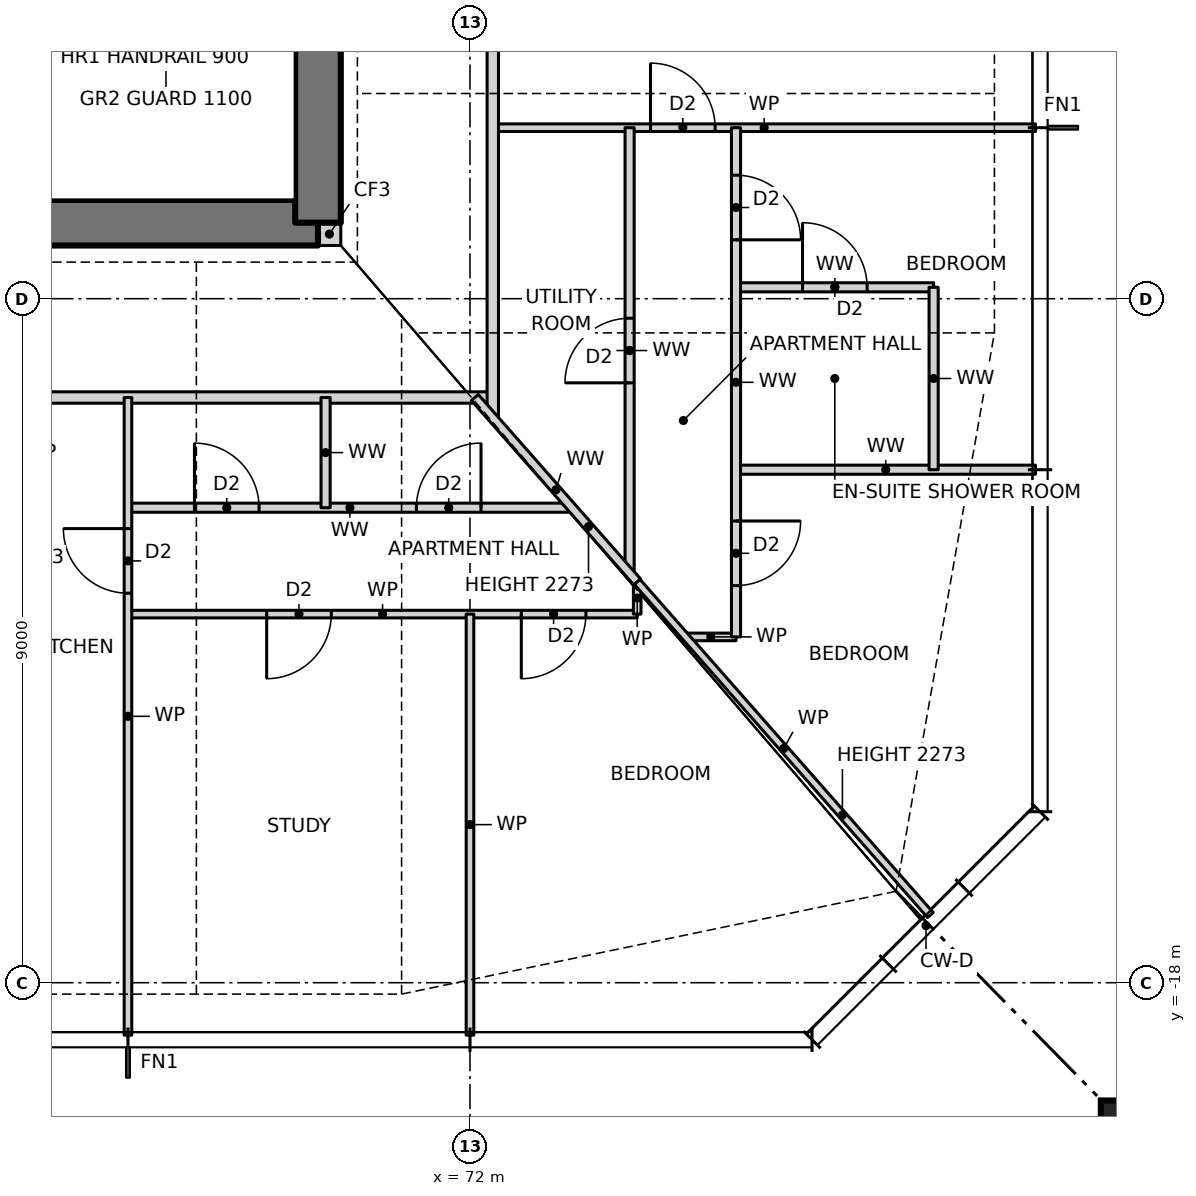
"""IFC4 building model, lengths in metres.
Left out: names, types, materials, properties, quantities, classifications, styles, units other than length and angle.
Written with IfcOpenShell. Run it as: python <this file> out.ifc"""

import sys

from ifc_helpers import new_model, si_unit, direction, frame, frame_2d, origin, origin_2d, place, context, subcontext, project, spatial, rectangle, hollow_rectangle, extrude, element, fill, save


model = new_model("IFC4")
c1 = context("Model", 3, precision=1e-05, world=origin(), true_north=direction((0.0, 1.0)))
c2 = subcontext(c1, "Body", "Model", "MODEL_VIEW")
j1 = project(units=[si_unit("LENGTHUNIT", "METRE"), si_unit("PLANEANGLEUNIT", "RADIAN")], contexts=[c1])
p1 = place(None, origin())
s1 = spatial("IfcSite", under=j1, at=p1, CompositionType="ELEMENT")
p2 = place(p1, origin())
s2 = spatial("IfcBuilding", under=s1, at=p2, CompositionType="ELEMENT")
p3 = place(p2, frame((0.0, 0.0, 71.0)))
s3 = spatial("IfcBuildingStorey", under=s2, at=p3, CompositionType="ELEMENT", Elevation=71.0)
p4 = place(p3, frame((80.9, -20.15, 0.0), z_axis=(0.0, 0.0, 1.0), x_axis=(1.0, 0.0, 0.0)))
e1 = element("IfcColumn", 1, at=p4, inside=s3, PredefinedType="COLUMN", context=c2, shape_type="SweptSolid", body=[
    extrude(hollow_rectangle(XDim=1.2, YDim=1.2, WallThickness=0.07, at=origin_2d()), origin(), (0.0, 0.0, 1.0), 3.5),
])
p5 = place(p3, frame((70.0, -8.15, 0.0), z_axis=(0.0, 0.0, 1.0), x_axis=(1.0, 0.0, 0.0)))
e2 = element("IfcWall", 2, at=p5, inside=s3, PredefinedType="SOLIDWALL", context=c2, shape_type="SweptSolid", body=[
    extrude(rectangle(XDim=0.3, YDim=0.3, at=frame_2d((0.15, 0.0))), origin(), (0.0, 0.0, 1.0), 3.5),
])
p6 = place(p3, frame((56.0, -8.0, 0.0), z_axis=(0.0, 0.0, 1.0), x_axis=(1.0, 0.0, 0.0)))
e3 = element("IfcWall", 3, at=p6, inside=s3, PredefinedType="SHEAR", context=c2, shape_type="SweptSolid", body=[
    extrude(rectangle(XDim=14.0, YDim=0.6, at=frame_2d((7.0, 0.0))), origin(), (0.0, 0.0, 1.0), 3.5),
])
p7 = place(p6, frame((2.7, 0.0, 0.0)))
e4 = element("IfcOpeningElement", 4, at=p7, cuts=e3, PredefinedType="OPENING", context=c2, shape_type="SweptSolid", body=[
    extrude(rectangle(XDim=0.9, YDim=2.1, at=frame_2d((0.45, 1.05))), frame((0.0, 0.31, 0.0), z_axis=(0.0, -1.0, 0.0), x_axis=(1.0, 0.0, 0.0)), (0.0, 0.0, 1.0), 0.62),
])
p8 = place(p6, frame((7.7, 0.0, 0.0)))
e5 = element("IfcOpeningElement", 5, at=p8, cuts=e3, PredefinedType="OPENING", context=c2, shape_type="SweptSolid", body=[
    extrude(rectangle(XDim=0.9, YDim=2.1, at=frame_2d((0.45, 1.05))), frame((0.0, 0.31, 0.0), z_axis=(0.0, -1.0, 0.0), x_axis=(1.0, 0.0, 0.0)), (0.0, 0.0, 1.0), 0.62),
])
p9 = place(p3, frame((70.0, -8.0, 0.0), z_axis=(0.0, 0.0, 1.0), x_axis=(0.0, 1.0, 0.0)))
e6 = element("IfcWall", 6, at=p9, inside=s3, PredefinedType="SHEAR", context=c2, shape_type="SweptSolid", body=[
    extrude(rectangle(XDim=16.0, YDim=0.6, at=frame_2d((8.0, 0.0))), origin(), (0.0, 0.0, 1.0), 3.5),
])
p10 = place(p9, frame((7.5, 0.0, 0.0)))
e7 = element("IfcOpeningElement", 7, at=p10, cuts=e6, PredefinedType="OPENING", context=c2, shape_type="SweptSolid", body=[
    extrude(rectangle(XDim=1.0, YDim=2.1, at=frame_2d((0.5, 1.05))), frame((0.0, 0.31, 0.0), z_axis=(0.0, -1.0, 0.0), x_axis=(1.0, 0.0, 0.0)), (0.0, 0.0, 1.0), 0.62),
])
p11 = place(p3, frame((74.836, -13.45, 0.0), z_axis=(0.0, 0.0, 1.0), x_axis=(1.0, 0.0, 0.0)))
e8 = element("IfcWall", 8, at=p11, inside=s3, PredefinedType="PARTITIONING", context=c2, shape_type="SweptSolid", body=[
    extrude(rectangle(XDim=0.664, YDim=0.1, at=frame_2d((0.332, 0.0))), origin(), (0.0, 0.0, 1.0), 3.2),
])
p12 = place(p3, frame((67.5, -13.15, 0.0), z_axis=(0.0, 0.0, 1.0), x_axis=(1.0, 0.0, 0.0)))
e9 = element("IfcWall", 9, at=p12, inside=s3, PredefinedType="PARTITIONING", context=c2, shape_type="SweptSolid", body=[
    extrude(rectangle(XDim=6.7, YDim=0.1, at=frame_2d((3.35, 0.0))), origin(), (0.0, 0.0, 1.0), 3.2),
])
p13 = place(p12, frame((1.825, 0.0, 0.0)))
e10 = element("IfcOpeningElement", 10, at=p13, cuts=e9, PredefinedType="OPENING", context=c2, shape_type="SweptSolid", body=[
    extrude(rectangle(XDim=0.85, YDim=2.1, at=frame_2d((0.425, 1.05))), frame((0.0, 0.06, 0.0), z_axis=(0.0, -1.0, 0.0), x_axis=(1.0, 0.0, 0.0)), (0.0, 0.0, 1.0), 0.12),
])
p14 = place(p12, frame((5.175, 0.0, 0.0)))
e11 = element("IfcOpeningElement", 11, at=p14, cuts=e9, PredefinedType="OPENING", context=c2, shape_type="SweptSolid", body=[
    extrude(rectangle(XDim=0.85, YDim=2.1, at=frame_2d((0.425, 1.05))), frame((0.0, 0.06, 0.0), z_axis=(0.0, -1.0, 0.0), x_axis=(1.0, 0.0, 0.0)), (0.0, 0.0, 1.0), 0.12),
])
p15 = place(p3, frame((67.5, -11.75, 0.0), z_axis=(0.0, 0.0, 1.0), x_axis=(1.0, 0.0, 0.0)))
e12 = element("IfcWall", 12, at=p15, inside=s3, PredefinedType="PARTITIONING", context=c2, shape_type="SweptSolid", body=[
    extrude(rectangle(XDim=5.84, YDim=0.12, at=frame_2d((2.92, 0.0))), origin(), (0.0, 0.0, 1.0), 3.2),
])
p16 = place(p15, frame((0.875, 0.0, 0.0)))
e13 = element("IfcOpeningElement", 13, at=p16, cuts=e12, PredefinedType="OPENING", context=c2, shape_type="SweptSolid", body=[
    extrude(rectangle(XDim=0.85, YDim=2.1, at=frame_2d((0.425, 1.05))), frame((0.0, 0.07, 0.0), z_axis=(0.0, -1.0, 0.0), x_axis=(1.0, 0.0, 0.0)), (0.0, 0.0, 1.0), 0.14),
])
p17 = place(p15, frame((3.795, 0.0, 0.0)))
e14 = element("IfcOpeningElement", 14, at=p17, cuts=e12, PredefinedType="OPENING", context=c2, shape_type="SweptSolid", body=[
    extrude(rectangle(XDim=0.85, YDim=2.1, at=frame_2d((0.425, 1.05))), frame((0.0, 0.07, 0.0), z_axis=(0.0, -1.0, 0.0), x_axis=(1.0, 0.0, 0.0)), (0.0, 0.0, 1.0), 0.14),
])
p18 = place(p3, frame((75.5, -11.25, 0.0), z_axis=(0.0, 0.0, 1.0), x_axis=(1.0, 0.0, 0.0)))
e15 = element("IfcWall", 15, at=p18, inside=s3, PredefinedType="PARTITIONING", context=c2, shape_type="SweptSolid", body=[
    extrude(rectangle(XDim=3.94, YDim=0.12, at=frame_2d((1.97, 0.0))), origin(), (0.0, 0.0, 1.0), 3.2),
])
p19 = place(p3, frame((53.7, -10.3, 0.0), z_axis=(0.0, 0.0, 1.0), x_axis=(1.0, 0.0, 0.0)))
e16 = element("IfcWall", 16, at=p19, inside=s3, PredefinedType="PARTITIONING", context=c2, shape_type="SweptSolid", body=[
    extrude(rectangle(XDim=18.6, YDim=0.15, at=frame_2d((9.3, 0.0))), origin(), (0.0, 0.0, 1.0), 3.2),
])
p20 = place(p19, frame((4.8, 0.0, 0.0)))
e17 = element("IfcOpeningElement", 17, at=p20, cuts=e16, PredefinedType="OPENING", context=c2, shape_type="SweptSolid", body=[
    extrude(rectangle(XDim=1.0, YDim=2.1, at=frame_2d((0.5, 1.05))), frame((0.0, 0.085, 0.0), z_axis=(0.0, -1.0, 0.0), x_axis=(1.0, 0.0, 0.0)), (0.0, 0.0, 1.0), 0.17),
])
p21 = place(p19, frame((10.2, 0.0, 0.0)))
e18 = element("IfcOpeningElement", 18, at=p21, cuts=e16, PredefinedType="OPENING", context=c2, shape_type="SweptSolid", body=[
    extrude(rectangle(XDim=1.0, YDim=2.1, at=frame_2d((0.5, 1.05))), frame((0.0, 0.085, 0.0), z_axis=(0.0, -1.0, 0.0), x_axis=(1.0, 0.0, 0.0)), (0.0, 0.0, 1.0), 0.17),
])
p22 = place(p3, frame((75.5, -8.85, 0.0), z_axis=(0.0, 0.0, 1.0), x_axis=(1.0, 0.0, 0.0)))
e19 = element("IfcWall", 19, at=p22, inside=s3, PredefinedType="PARTITIONING", context=c2, shape_type="SweptSolid", body=[
    extrude(rectangle(XDim=2.6, YDim=0.12, at=frame_2d((1.3, 0.0))), origin(), (0.0, 0.0, 1.0), 3.2),
])
p23 = place(p22, frame((0.875, 0.0, 0.0)))
e20 = element("IfcOpeningElement", 20, at=p23, cuts=e19, PredefinedType="OPENING", context=c2, shape_type="SweptSolid", body=[
    extrude(rectangle(XDim=0.85, YDim=2.1, at=frame_2d((0.425, 1.05))), frame((0.0, 0.07, 0.0), z_axis=(0.0, -1.0, 0.0), x_axis=(1.0, 0.0, 0.0)), (0.0, 0.0, 1.0), 0.14),
])
p24 = place(p3, frame((72.3, -6.75, 0.0), z_axis=(0.0, 0.0, 1.0), x_axis=(1.0, 0.0, 0.0)))
e21 = element("IfcWall", 21, at=p24, inside=s3, PredefinedType="PARTITIONING", context=c2, shape_type="SweptSolid", body=[
    extrude(rectangle(XDim=7.14, YDim=0.1, at=frame_2d((3.57, 0.0))), origin(), (0.0, 0.0, 1.0), 3.2),
])
p25 = place(p24, frame((2.075, 0.0, 0.0)))
e22 = element("IfcOpeningElement", 22, at=p25, cuts=e21, PredefinedType="OPENING", context=c2, shape_type="SweptSolid", body=[
    extrude(rectangle(XDim=0.85, YDim=2.1, at=frame_2d((0.425, 1.05))), frame((0.0, 0.06, 0.0), z_axis=(0.0, -1.0, 0.0), x_axis=(1.0, 0.0, 0.0)), (0.0, 0.0, 1.0), 0.12),
])
p26 = place(p3, frame((78.1, -11.25, 0.0), z_axis=(0.0, 0.0, 1.0), x_axis=(0.0, 1.0, 0.0)))
e23 = element("IfcWall", 23, at=p26, inside=s3, PredefinedType="PARTITIONING", context=c2, shape_type="SweptSolid", body=[
    extrude(rectangle(XDim=2.4, YDim=0.12, at=frame_2d((1.2, 0.0))), origin(), (0.0, 0.0, 1.0), 3.2),
])
p27 = place(p3, frame((75.5, -13.45, 0.0), z_axis=(0.0, 0.0, 1.0), x_axis=(0.0, 1.0, 0.0)))
e24 = element("IfcWall", 24, at=p27, inside=s3, PredefinedType="PARTITIONING", context=c2, shape_type="SweptSolid", body=[
    extrude(rectangle(XDim=6.7, YDim=0.12, at=frame_2d((3.35, 0.0))), origin(), (0.0, 0.0, 1.0), 3.2),
])
p28 = place(p27, frame((5.225, 0.0, 0.0)))
e25 = element("IfcOpeningElement", 25, at=p28, cuts=e24, PredefinedType="OPENING", context=c2, shape_type="SweptSolid", body=[
    extrude(rectangle(XDim=0.85, YDim=2.1, at=frame_2d((0.425, 1.05))), frame((0.0, 0.07, 0.0), z_axis=(0.0, -1.0, 0.0), x_axis=(1.0, 0.0, 0.0)), (0.0, 0.0, 1.0), 0.14),
])
p29 = place(p27, frame((0.675, 0.0, 0.0)))
e26 = element("IfcOpeningElement", 26, at=p29, cuts=e24, PredefinedType="OPENING", context=c2, shape_type="SweptSolid", body=[
    extrude(rectangle(XDim=0.85, YDim=2.1, at=frame_2d((0.425, 1.05))), frame((0.0, 0.07, 0.0), z_axis=(0.0, -1.0, 0.0), x_axis=(1.0, 0.0, 0.0)), (0.0, 0.0, 1.0), 0.14),
])
p30 = place(p3, frame((74.2, -13.15, 0.0), z_axis=(0.0, 0.0, 1.0), x_axis=(0.0, 1.0, 0.0)))
e27 = element("IfcWall", 27, at=p30, inside=s3, PredefinedType="PARTITIONING", context=c2, shape_type="SweptSolid", body=[
    extrude(rectangle(XDim=0.423, YDim=0.1, at=frame_2d((0.211, 0.0))), origin(), (0.0, 0.0, 1.0), 3.2),
])
p31 = place(p3, frame((74.1, -12.614, 0.0), z_axis=(0.0, 0.0, 1.0), x_axis=(0.0, 1.0, 0.0)))
e28 = element("IfcWall", 28, at=p31, inside=s3, PredefinedType="PARTITIONING", context=c2, shape_type="SweptSolid", body=[
    extrude(rectangle(XDim=5.864, YDim=0.12, at=frame_2d((2.932, 0.0))), origin(), (0.0, 0.0, 1.0), 3.2),
])
p32 = place(p31, frame((2.507, 0.0, 0.0)))
e29 = element("IfcOpeningElement", 29, at=p32, cuts=e28, PredefinedType="OPENING", context=c2, shape_type="SweptSolid", body=[
    extrude(rectangle(XDim=0.85, YDim=2.1, at=frame_2d((0.425, 1.05))), frame((0.0, 0.07, 0.0), z_axis=(0.0, -1.0, 0.0), x_axis=(1.0, 0.0, 0.0)), (0.0, 0.0, 1.0), 0.14),
])
p33 = place(p3, frame((72.3, -10.568, 0.0), z_axis=(0.0, 0.0, 1.0), x_axis=(0.0, 1.0, 0.0)))
e30 = element("IfcWall", 30, at=p33, inside=s3, PredefinedType="PARTITIONING", context=c2, shape_type="SweptSolid", body=[
    extrude(rectangle(XDim=21.136, YDim=0.15, at=frame_2d((10.568, 0.0))), origin(), (0.0, 0.0, 1.0), 3.2),
])
p34 = place(p33, frame((10.068, 0.0, 0.0)))
e31 = element("IfcOpeningElement", 31, at=p34, cuts=e30, PredefinedType="OPENING", context=c2, shape_type="SweptSolid", body=[
    extrude(rectangle(XDim=1.0, YDim=2.1, at=frame_2d((0.5, 1.05))), frame((0.0, 0.085, 0.0), z_axis=(0.0, -1.0, 0.0), x_axis=(1.0, 0.0, 0.0)), (0.0, 0.0, 1.0), 0.17),
])
p35 = place(p3, frame((72.0, -18.69, 0.0), z_axis=(0.0, 0.0, 1.0), x_axis=(0.0, 1.0, 0.0)))
e32 = element("IfcWall", 32, at=p35, inside=s3, PredefinedType="PARTITIONING", context=c2, shape_type="SweptSolid", body=[
    extrude(rectangle(XDim=5.54, YDim=0.1, at=frame_2d((2.77, 0.0))), origin(), (0.0, 0.0, 1.0), 3.2),
])
p36 = place(p3, frame((70.1, -11.75, 0.0), z_axis=(0.0, 0.0, 1.0), x_axis=(0.0, 1.0, 0.0)))
e33 = element("IfcWall", 33, at=p36, inside=s3, PredefinedType="PARTITIONING", context=c2, shape_type="SweptSolid", body=[
    extrude(rectangle(XDim=1.45, YDim=0.12, at=frame_2d((0.725, 0.0))), origin(), (0.0, 0.0, 1.0), 3.2),
])
p37 = place(p3, frame((67.5, -18.69, 0.0), z_axis=(0.0, 0.0, 1.0), x_axis=(0.0, 1.0, 0.0)))
e34 = element("IfcWall", 34, at=p37, inside=s3, PredefinedType="PARTITIONING", context=c2, shape_type="SweptSolid", body=[
    extrude(rectangle(XDim=8.39, YDim=0.1, at=frame_2d((4.195, 0.0))), origin(), (0.0, 0.0, 1.0), 3.2),
])
p38 = place(p37, frame((5.815, 0.0, 0.0)))
e35 = element("IfcOpeningElement", 35, at=p38, cuts=e34, PredefinedType="OPENING", context=c2, shape_type="SweptSolid", body=[
    extrude(rectangle(XDim=0.85, YDim=2.1, at=frame_2d((0.425, 1.05))), frame((0.0, 0.06, 0.0), z_axis=(0.0, -1.0, 0.0), x_axis=(1.0, 0.0, 0.0)), (0.0, 0.0, 1.0), 0.12),
])
p39 = place(p3, frame((74.2, -12.727, 0.0), z_axis=(0.0, 0.0, 1.0), x_axis=(-0.660667046586, 0.75067906162, 0.0)))
e36 = element("IfcWall", 36, at=p39, inside=s3, PredefinedType="PARTITIONING", context=c2, shape_type="SweptSolid", body=[
    extrude(rectangle(XDim=3.233, YDim=0.12, at=frame_2d((1.617, 0.0))), origin(), (0.0, 0.0, 1.0), 2.273),
])
p40 = place(p3, frame((78.057, -17.109, 0.0), z_axis=(0.0, 0.0, 1.0), x_axis=(-0.660698595885, 0.750651294141, 0.0)))
e37 = element("IfcWall", 37, at=p40, inside=s3, PredefinedType="PARTITIONING", context=c2, shape_type="SweptSolid", body=[
    extrude(rectangle(XDim=5.838, YDim=0.1, at=frame_2d((2.919, 0.0))), origin(), (0.0, 0.0, 1.0), 2.273),
])
p41 = place(p38, origin())
e38 = element("IfcDoor", 38, at=p41, inside=s3, OperationType="SINGLE_SWING_RIGHT", PredefinedType="DOOR", context=c2, shape_type="SweptSolid", body=[
    extrude(rectangle(XDim=0.85, YDim=2.1, at=frame_2d((0.425, 1.05))), frame((0.0, 0.025, 0.0), z_axis=(0.0, -1.0, 0.0), x_axis=(1.0, 0.0, 0.0)), (0.0, 0.0, 1.0), 0.05),
])
fill(e35, e38)
p42 = place(p13, frame((0.85, 0.0, 0.0), z_axis=(0.0, 0.0, 1.0), x_axis=(-1.0, 0.0, 0.0)))
e39 = element("IfcDoor", 39, at=p42, inside=s3, OperationType="SINGLE_SWING_RIGHT", PredefinedType="DOOR", context=c2, shape_type="SweptSolid", body=[
    extrude(rectangle(XDim=0.85, YDim=2.1, at=frame_2d((0.425, 1.05))), frame((0.0, 0.025, 0.0), z_axis=(0.0, -1.0, 0.0), x_axis=(1.0, 0.0, 0.0)), (0.0, 0.0, 1.0), 0.05),
])
fill(e10, e39)
p43 = place(p14, frame((0.85, 0.0, 0.0), z_axis=(0.0, 0.0, 1.0), x_axis=(-1.0, 0.0, 0.0)))
e40 = element("IfcDoor", 40, at=p43, inside=s3, OperationType="SINGLE_SWING_RIGHT", PredefinedType="DOOR", context=c2, shape_type="SweptSolid", body=[
    extrude(rectangle(XDim=0.85, YDim=2.1, at=frame_2d((0.425, 1.05))), frame((0.0, 0.025, 0.0), z_axis=(0.0, -1.0, 0.0), x_axis=(1.0, 0.0, 0.0)), (0.0, 0.0, 1.0), 0.05),
])
fill(e11, e40)
p44 = place(p16, origin())
e41 = element("IfcDoor", 41, at=p44, inside=s3, OperationType="SINGLE_SWING_LEFT", PredefinedType="DOOR", context=c2, shape_type="SweptSolid", body=[
    extrude(rectangle(XDim=0.85, YDim=2.1, at=frame_2d((0.425, 1.05))), frame((0.0, 0.025, 0.0), z_axis=(0.0, -1.0, 0.0), x_axis=(1.0, 0.0, 0.0)), (0.0, 0.0, 1.0), 0.05),
])
fill(e13, e41)
p45 = place(p17, origin())
e42 = element("IfcDoor", 42, at=p45, inside=s3, OperationType="SINGLE_SWING_RIGHT", PredefinedType="DOOR", context=c2, shape_type="SweptSolid", body=[
    extrude(rectangle(XDim=0.85, YDim=2.1, at=frame_2d((0.425, 1.05))), frame((0.0, 0.025, 0.0), z_axis=(0.0, -1.0, 0.0), x_axis=(1.0, 0.0, 0.0)), (0.0, 0.0, 1.0), 0.05),
])
fill(e14, e42)
p46 = place(p25, origin())
e43 = element("IfcDoor", 43, at=p46, inside=s3, OperationType="SINGLE_SWING_LEFT", PredefinedType="DOOR", context=c2, shape_type="SweptSolid", body=[
    extrude(rectangle(XDim=0.85, YDim=2.1, at=frame_2d((0.425, 1.05))), frame((0.0, 0.025, 0.0), z_axis=(0.0, -1.0, 0.0), x_axis=(1.0, 0.0, 0.0)), (0.0, 0.0, 1.0), 0.05),
])
fill(e22, e43)
p47 = place(p23, origin())
e44 = element("IfcDoor", 44, at=p47, inside=s3, OperationType="SINGLE_SWING_LEFT", PredefinedType="DOOR", context=c2, shape_type="SweptSolid", body=[
    extrude(rectangle(XDim=0.85, YDim=2.1, at=frame_2d((0.425, 1.05))), frame((0.0, 0.025, 0.0), z_axis=(0.0, -1.0, 0.0), x_axis=(1.0, 0.0, 0.0)), (0.0, 0.0, 1.0), 0.05),
])
fill(e20, e44)
p48 = place(p28, frame((0.85, 0.0, 0.0), z_axis=(0.0, 0.0, 1.0), x_axis=(-1.0, 0.0, 0.0)))
e45 = element("IfcDoor", 45, at=p48, inside=s3, OperationType="SINGLE_SWING_RIGHT", PredefinedType="DOOR", context=c2, shape_type="SweptSolid", body=[
    extrude(rectangle(XDim=0.85, YDim=2.1, at=frame_2d((0.425, 1.05))), frame((0.0, 0.025, 0.0), z_axis=(0.0, -1.0, 0.0), x_axis=(1.0, 0.0, 0.0)), (0.0, 0.0, 1.0), 0.05),
])
fill(e25, e45)
p49 = place(p29, frame((0.85, 0.0, 0.0), z_axis=(0.0, 0.0, 1.0), x_axis=(-1.0, 0.0, 0.0)))
e46 = element("IfcDoor", 46, at=p49, inside=s3, OperationType="SINGLE_SWING_LEFT", PredefinedType="DOOR", context=c2, shape_type="SweptSolid", body=[
    extrude(rectangle(XDim=0.85, YDim=2.1, at=frame_2d((0.425, 1.05))), frame((0.0, 0.025, 0.0), z_axis=(0.0, -1.0, 0.0), x_axis=(1.0, 0.0, 0.0)), (0.0, 0.0, 1.0), 0.05),
])
fill(e26, e46)
p50 = place(p32, origin())
e47 = element("IfcDoor", 47, at=p50, inside=s3, OperationType="SINGLE_SWING_LEFT", PredefinedType="DOOR", context=c2, shape_type="SweptSolid", body=[
    extrude(rectangle(XDim=0.85, YDim=2.1, at=frame_2d((0.425, 1.05))), frame((0.0, 0.025, 0.0), z_axis=(0.0, -1.0, 0.0), x_axis=(1.0, 0.0, 0.0)), (0.0, 0.0, 1.0), 0.05),
])
fill(e29, e47)
save(model, sys.argv[1])
